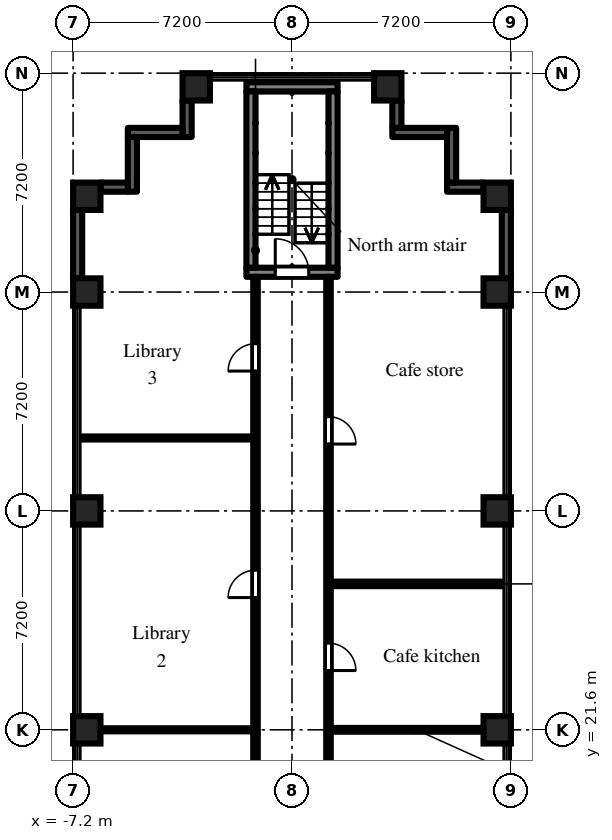
"""IFC4 building model, lengths in metres.
Left out: names, types, materials, properties, quantities, classifications, styles, units other than length and angle.
Written with IfcOpenShell. Run it as: python <this file> out.ifc"""

import sys

from ifc_helpers import new_model, si_unit, direction, frame, frame_2d, origin, origin_2d, place, context, subcontext, project, spatial, rectangle, extrude, element, fill, save


model = new_model("IFC4")
c1 = context("Model", 3, precision=1e-05, world=origin(), true_north=direction((0.0, 1.0)))
c2 = subcontext(c1, "Body", "Model", "MODEL_VIEW")
j1 = project(units=[si_unit("LENGTHUNIT", "METRE"), si_unit("PLANEANGLEUNIT", "RADIAN")], contexts=[c1])
p1 = place(None, origin())
s1 = spatial("IfcSite", under=j1, at=p1, CompositionType="ELEMENT")
p2 = place(p1, origin())
s2 = spatial("IfcBuilding", under=s1, at=p2, CompositionType="ELEMENT")
p3 = place(p2, frame((0.0, 0.0, 7.2)))
s3 = spatial("IfcBuildingStorey", under=s2, at=p3, CompositionType="ELEMENT", Elevation=7.2)
for number, where, z_axis, x_axis in (
    (1, (-6.75, 21.6, 0.0), (0.0, 0.0, 1.0), (1.0, 0.0, 0.0)),
    (2, (-6.75, 28.8, 0.0), (0.0, 0.0, 1.0), (1.0, 0.0, 0.0)),
    (3, (-6.75, 36.0, 0.0), (0.0, 0.0, 1.0), (1.0, 0.0, 0.0)),
    (4, (-6.75, 39.15, 0.0), (0.0, 0.0, 1.0), (1.0, 0.0, 0.0)),
    (5, (-3.15, 42.75, 0.0), (0.0, 0.0, 1.0), (1.0, 0.0, 0.0)),
    (6, (3.15, 42.75, 0.0), (0.0, 0.0, 1.0), (1.0, 0.0, 0.0)),
    (7, (6.75, 21.6, 0.0), (0.0, 0.0, 1.0), (1.0, 0.0, 0.0)),
    (8, (6.75, 28.8, 0.0), (0.0, 0.0, 1.0), (1.0, 0.0, 0.0)),
    (9, (6.75, 36.0, 0.0), (0.0, 0.0, 1.0), (1.0, 0.0, 0.0)),
    (10, (6.75, 39.15, 0.0), (0.0, 0.0, 1.0), (1.0, 0.0, 0.0)),
):
    element("IfcColumn", number, at=place(p3, frame(where, z_axis=z_axis, x_axis=x_axis)), inside=s3, PredefinedType="COLUMN", context=c2, shape_type="SweptSolid", body=[
        extrude(rectangle(XDim=0.9, YDim=0.9, at=origin_2d()), origin(), (0.0, 0.0, 1.0), 4.5),
    ])
p4 = place(p3, frame((7.05, 36.45, 0.0), z_axis=(0.0, 0.0, 1.0), x_axis=(0.0, 1.0, 0.0)))
e11 = element("IfcWall", 11, at=p4, inside=s3, PredefinedType="SOLIDWALL", context=c2, shape_type="SweptSolid", body=[
    extrude(rectangle(XDim=2.25, YDim=0.3, at=frame_2d((1.125, 0.0))), origin(), (0.0, 0.0, 1.0), 3.6),
])
p5 = place(p3, frame((6.3, 39.45, 0.0), z_axis=(0.0, 0.0, 1.0), x_axis=(-1.0, 0.0, 0.0)))
e12 = element("IfcWall", 12, at=p5, inside=s3, PredefinedType="SOLIDWALL", context=c2, shape_type="SweptSolid", body=[
    extrude(rectangle(XDim=1.2, YDim=0.3, at=frame_2d((0.6, 0.0))), origin(), (0.0, 0.0, 1.0), 4.075),
])
p6 = place(p3, frame((5.25, 39.6, 0.0), z_axis=(0.0, 0.0, 1.0), x_axis=(0.0, 1.0, 0.0)))
e13 = element("IfcWall", 13, at=p6, inside=s3, PredefinedType="SOLIDWALL", context=c2, shape_type="SweptSolid", body=[
    extrude(rectangle(XDim=1.8, YDim=0.3, at=frame_2d((0.9, 0.0))), origin(), (0.0, 0.0, 1.0), 4.075),
])
p7 = place(p3, frame((5.1, 41.25, 0.0), z_axis=(0.0, 0.0, 1.0), x_axis=(-1.0, 0.0, 0.0)))
e14 = element("IfcWall", 14, at=p7, inside=s3, PredefinedType="SOLIDWALL", context=c2, shape_type="SweptSolid", body=[
    extrude(rectangle(XDim=1.8, YDim=0.3, at=frame_2d((0.9, 0.0))), origin(), (0.0, 0.0, 1.0), 4.075),
])
p8 = place(p3, frame((3.45, 41.4, 0.0), z_axis=(0.0, 0.0, 1.0), x_axis=(0.0, 1.0, 0.0)))
e15 = element("IfcWall", 15, at=p8, inside=s3, PredefinedType="SOLIDWALL", context=c2, shape_type="SweptSolid", body=[
    extrude(rectangle(XDim=0.9, YDim=0.3, at=frame_2d((0.45, 0.0))), origin(), (0.0, 0.0, 1.0), 4.075),
])
p9 = place(p3, frame((-3.45, 42.3, 0.0), z_axis=(0.0, 0.0, 1.0), x_axis=(0.0, -1.0, 0.0)))
e16 = element("IfcWall", 16, at=p9, inside=s3, PredefinedType="SOLIDWALL", context=c2, shape_type="SweptSolid", body=[
    extrude(rectangle(XDim=1.2, YDim=0.3, at=frame_2d((0.6, 0.0))), origin(), (0.0, 0.0, 1.0), 4.075),
])
p10 = place(p3, frame((-3.6, 41.25, 0.0), z_axis=(0.0, 0.0, 1.0), x_axis=(-1.0, 0.0, 0.0)))
e17 = element("IfcWall", 17, at=p10, inside=s3, PredefinedType="SOLIDWALL", context=c2, shape_type="SweptSolid", body=[
    extrude(rectangle(XDim=1.8, YDim=0.3, at=frame_2d((0.9, 0.0))), origin(), (0.0, 0.0, 1.0), 4.075),
])
p11 = place(p3, frame((-5.25, 41.1, 0.0), z_axis=(0.0, 0.0, 1.0), x_axis=(0.0, -1.0, 0.0)))
e18 = element("IfcWall", 18, at=p11, inside=s3, PredefinedType="SOLIDWALL", context=c2, shape_type="SweptSolid", body=[
    extrude(rectangle(XDim=1.8, YDim=0.3, at=frame_2d((0.9, 0.0))), origin(), (0.0, 0.0, 1.0), 4.075),
])
p12 = place(p3, frame((-5.4, 39.45, 0.0), z_axis=(0.0, 0.0, 1.0), x_axis=(-1.0, 0.0, 0.0)))
e19 = element("IfcWall", 19, at=p12, inside=s3, PredefinedType="SOLIDWALL", context=c2, shape_type="SweptSolid", body=[
    extrude(rectangle(XDim=0.9, YDim=0.3, at=frame_2d((0.45, 0.0))), origin(), (0.0, 0.0, 1.0), 4.075),
])
p13 = place(p3, frame((-7.05, 38.7, 0.0), z_axis=(0.0, 0.0, 1.0), x_axis=(0.0, -1.0, 0.0)))
e20 = element("IfcWall", 20, at=p13, inside=s3, PredefinedType="SOLIDWALL", context=c2, shape_type="SweptSolid", body=[
    extrude(rectangle(XDim=2.25, YDim=0.3, at=frame_2d((1.125, 0.0))), origin(), (0.0, 0.0, 1.0), 3.6),
])
p14 = place(p3, frame((-1.5, 36.65, 0.0), z_axis=(0.0, 0.0, 1.0), x_axis=(1.0, 0.0, 0.0)))
e21 = element("IfcWall", 21, at=p14, inside=s3, PredefinedType="SHEAR", context=c2, shape_type="SweptSolid", body=[
    extrude(rectangle(XDim=3.0, YDim=0.3, at=frame_2d((1.5, 0.0))), origin(), (0.0, 0.0, 1.0), 4.075),
])
p15 = place(p14, frame((0.95, 0.0, 0.0)))
e22 = element("IfcOpeningElement", 22, at=p15, cuts=e21, PredefinedType="OPENING", context=c2, shape_type="SweptSolid", body=[
    extrude(rectangle(XDim=1.1, YDim=2.1, at=frame_2d((0.55, 1.05))), frame((0.0, 0.16, 0.0), z_axis=(0.0, -1.0, 0.0), x_axis=(1.0, 0.0, 0.0)), (0.0, 0.0, 1.0), 0.32),
])
p16 = place(p3, frame((-1.5, 42.75, 0.0), z_axis=(0.0, 0.0, 1.0), x_axis=(1.0, 0.0, 0.0)))
e23 = element("IfcWall", 23, at=p16, inside=s3, PredefinedType="SHEAR", context=c2, shape_type="SweptSolid", body=[
    extrude(rectangle(XDim=3.0, YDim=0.3, at=frame_2d((1.5, 0.0))), origin(), (0.0, 0.0, 1.0), 4.075),
])
for number, where, z_axis, x_axis in (
    (24, (-1.35, 36.8, 0.0), (0.0, 0.0, 1.0), (0.0, 1.0, 0.0)),
    (25, (1.35, 36.8, 0.0), (0.0, 0.0, 1.0), (0.0, 1.0, 0.0)),
):
    element("IfcWall", number, at=place(p3, frame(where, z_axis=z_axis, x_axis=x_axis)), inside=s3, PredefinedType="SHEAR", context=c2, shape_type="SweptSolid", body=[
        extrude(rectangle(XDim=5.8, YDim=0.3, at=frame_2d((2.9, 0.0))), origin(), (0.0, 0.0, 1.0), 4.075),
    ])
p17 = place(p3, frame((-6.9, 21.6, 0.0), z_axis=(0.0, 0.0, 1.0), x_axis=(1.0, 0.0, 0.0)))
e26 = element("IfcWall", 26, at=p17, inside=s3, PredefinedType="PARTITIONING", context=c2, shape_type="SweptSolid", body=[
    extrude(rectangle(XDim=5.625, YDim=0.1, at=frame_2d((2.812, 0.0))), origin(), (0.0, 0.0, 1.0), 4.075),
])
p18 = place(p3, frame((-7.02, 31.2, 0.0), z_axis=(0.0, 0.0, 1.0), x_axis=(1.0, 0.0, 0.0)))
e27 = element("IfcWall", 27, at=p18, inside=s3, PredefinedType="PARTITIONING", context=c2, shape_type="SweptSolid", body=[
    extrude(rectangle(XDim=5.745, YDim=0.1, at=frame_2d((2.873, 0.0))), origin(), (0.0, 0.0, 1.0), 4.075),
])
p19 = place(p3, frame((-1.2, 7.275, 0.0), z_axis=(0.0, 0.0, 1.0), x_axis=(0.0, 1.0, 0.0)))
e28 = element("IfcWall", 28, at=p19, inside=s3, PredefinedType="PARTITIONING", context=c2, shape_type="SweptSolid", body=[
    extrude(rectangle(XDim=29.225, YDim=0.15, at=frame_2d((14.613, 0.0))), origin(), (0.0, 0.0, 1.0), 4.075),
])
p20 = place(p19, frame((6.675, 0.0, 0.0)))
e29 = element("IfcOpeningElement", 29, at=p20, cuts=e28, PredefinedType="OPENING", context=c2, shape_type="SweptSolid", body=[
    extrude(rectangle(XDim=0.9, YDim=2.1, at=frame_2d((0.45, 1.05))), frame((0.0, 0.085, 0.0), z_axis=(0.0, -1.0, 0.0), x_axis=(1.0, 0.0, 0.0)), (0.0, 0.0, 1.0), 0.17),
])
p21 = place(p19, frame((18.675, 0.0, 0.0)))
e30 = element("IfcOpeningElement", 30, at=p21, cuts=e28, PredefinedType="OPENING", context=c2, shape_type="SweptSolid", body=[
    extrude(rectangle(XDim=0.9, YDim=2.1, at=frame_2d((0.45, 1.05))), frame((0.0, 0.085, 0.0), z_axis=(0.0, -1.0, 0.0), x_axis=(1.0, 0.0, 0.0)), (0.0, 0.0, 1.0), 0.17),
])
p22 = place(p19, frame((26.125, 0.0, 0.0)))
e31 = element("IfcOpeningElement", 31, at=p22, cuts=e28, PredefinedType="OPENING", context=c2, shape_type="SweptSolid", body=[
    extrude(rectangle(XDim=0.9, YDim=2.1, at=frame_2d((0.45, 1.05))), frame((0.0, 0.085, 0.0), z_axis=(0.0, -1.0, 0.0), x_axis=(1.0, 0.0, 0.0)), (0.0, 0.0, 1.0), 0.17),
])
p23 = place(p3, frame((1.2, 7.275, 0.0), z_axis=(0.0, 0.0, 1.0), x_axis=(0.0, 1.0, 0.0)))
e32 = element("IfcWall", 32, at=p23, inside=s3, PredefinedType="PARTITIONING", context=c2, shape_type="SweptSolid", body=[
    extrude(rectangle(XDim=29.225, YDim=0.15, at=frame_2d((14.613, 0.0))), origin(), (0.0, 0.0, 1.0), 4.075),
])
p24 = place(p23, frame((6.225, 0.0, 0.0)))
e33 = element("IfcOpeningElement", 33, at=p24, cuts=e32, PredefinedType="OPENING", context=c2, shape_type="SweptSolid", body=[
    extrude(rectangle(XDim=1.8, YDim=2.1, at=frame_2d((0.9, 1.05))), frame((0.0, 0.085, 0.0), z_axis=(0.0, -1.0, 0.0), x_axis=(1.0, 0.0, 0.0)), (0.0, 0.0, 1.0), 0.17),
])
p25 = place(p23, frame((16.275, 0.0, 0.0)))
e34 = element("IfcOpeningElement", 34, at=p25, cuts=e32, PredefinedType="OPENING", context=c2, shape_type="SweptSolid", body=[
    extrude(rectangle(XDim=0.9, YDim=2.1, at=frame_2d((0.45, 1.05))), frame((0.0, 0.085, 0.0), z_axis=(0.0, -1.0, 0.0), x_axis=(1.0, 0.0, 0.0)), (0.0, 0.0, 1.0), 0.17),
])
p26 = place(p23, frame((23.725, 0.0, 0.0)))
e35 = element("IfcOpeningElement", 35, at=p26, cuts=e32, PredefinedType="OPENING", context=c2, shape_type="SweptSolid", body=[
    extrude(rectangle(XDim=0.9, YDim=2.1, at=frame_2d((0.45, 1.05))), frame((0.0, 0.085, 0.0), z_axis=(0.0, -1.0, 0.0), x_axis=(1.0, 0.0, 0.0)), (0.0, 0.0, 1.0), 0.17),
])
p27 = place(p3, frame((1.275, 21.6, 0.0), z_axis=(0.0, 0.0, 1.0), x_axis=(1.0, 0.0, 0.0)))
e36 = element("IfcWall", 36, at=p27, inside=s3, PredefinedType="PARTITIONING", context=c2, shape_type="SweptSolid", body=[
    extrude(rectangle(XDim=5.625, YDim=0.125, at=frame_2d((2.812, 0.0))), origin(), (0.0, 0.0, 1.0), 4.075),
])
p28 = place(p3, frame((1.275, 26.4, 0.0), z_axis=(0.0, 0.0, 1.0), x_axis=(1.0, 0.0, 0.0)))
e37 = element("IfcWall", 37, at=p28, inside=s3, PredefinedType="PARTITIONING", context=c2, shape_type="SweptSolid", body=[
    extrude(rectangle(XDim=5.745, YDim=0.15, at=frame_2d((2.873, 0.0))), origin(), (0.0, 0.0, 1.0), 4.075),
])
p29 = place(p15, origin())
e38 = element("IfcDoor", 38, at=p29, inside=s3, OperationType="SINGLE_SWING_LEFT", PredefinedType="DOOR", context=c2, shape_type="SweptSolid", body=[
    extrude(rectangle(XDim=1.1, YDim=2.1, at=frame_2d((0.55, 1.05))), frame((0.0, 0.025, 0.0), z_axis=(0.0, -1.0, 0.0), x_axis=(1.0, 0.0, 0.0)), (0.0, 0.0, 1.0), 0.05),
])
fill(e22, e38)
p30 = place(p21, origin())
e39 = element("IfcDoor", 39, at=p30, inside=s3, OperationType="SINGLE_SWING_LEFT", PredefinedType="DOOR", context=c2, shape_type="SweptSolid", body=[
    extrude(rectangle(XDim=0.9, YDim=2.1, at=frame_2d((0.45, 1.05))), frame((0.0, 0.025, 0.0), z_axis=(0.0, -1.0, 0.0), x_axis=(1.0, 0.0, 0.0)), (0.0, 0.0, 1.0), 0.05),
])
fill(e30, e39)
p31 = place(p22, origin())
e40 = element("IfcDoor", 40, at=p31, inside=s3, OperationType="SINGLE_SWING_LEFT", PredefinedType="DOOR", context=c2, shape_type="SweptSolid", body=[
    extrude(rectangle(XDim=0.9, YDim=2.1, at=frame_2d((0.45, 1.05))), frame((0.0, 0.025, 0.0), z_axis=(0.0, -1.0, 0.0), x_axis=(1.0, 0.0, 0.0)), (0.0, 0.0, 1.0), 0.05),
])
fill(e31, e40)
p32 = place(p25, frame((0.9, 0.0, 0.0), z_axis=(0.0, 0.0, 1.0), x_axis=(-1.0, 0.0, 0.0)))
e41 = element("IfcDoor", 41, at=p32, inside=s3, OperationType="SINGLE_SWING_RIGHT", PredefinedType="DOOR", context=c2, shape_type="SweptSolid", body=[
    extrude(rectangle(XDim=0.9, YDim=2.1, at=frame_2d((0.45, 1.05))), frame((0.0, 0.025, 0.0), z_axis=(0.0, -1.0, 0.0), x_axis=(1.0, 0.0, 0.0)), (0.0, 0.0, 1.0), 0.05),
])
fill(e34, e41)
p33 = place(p26, frame((0.9, 0.0, 0.0), z_axis=(0.0, 0.0, 1.0), x_axis=(-1.0, 0.0, 0.0)))
e42 = element("IfcDoor", 42, at=p33, inside=s3, OperationType="SINGLE_SWING_RIGHT", PredefinedType="DOOR", context=c2, shape_type="SweptSolid", body=[
    extrude(rectangle(XDim=0.9, YDim=2.1, at=frame_2d((0.45, 1.05))), frame((0.0, 0.025, 0.0), z_axis=(0.0, -1.0, 0.0), x_axis=(1.0, 0.0, 0.0)), (0.0, 0.0, 1.0), 0.05),
])
fill(e35, e42)
save(model, sys.argv[1])
